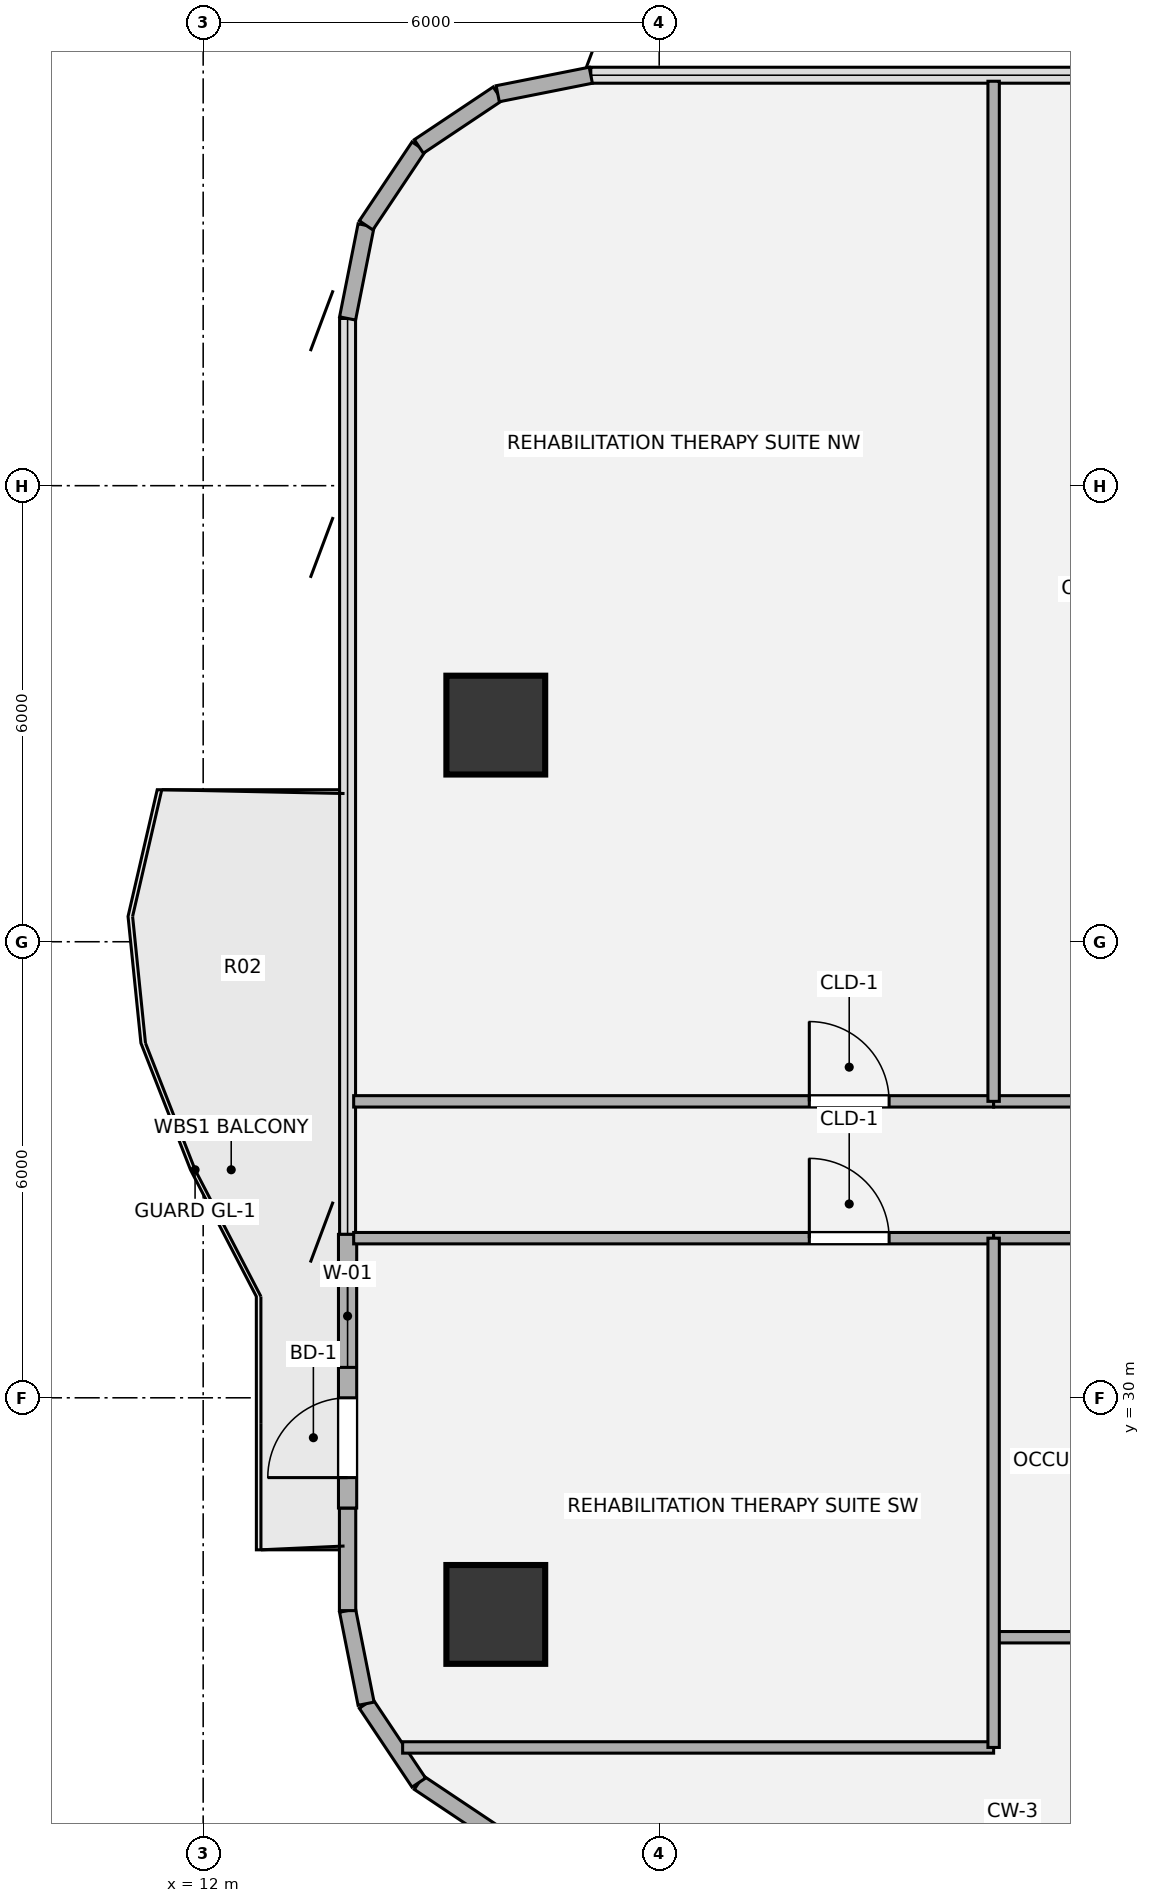
"""IFC4 building model, lengths in metres.
Left out: names, types, materials, properties, quantities, classifications, styles, units other than length and angle.
Written with IfcOpenShell. Run it as: python <this file> out.ifc"""

import sys

from ifc_helpers import new_model, si_unit, direction, frame, frame_2d, origin, origin_2d, place, context, subcontext, project, spatial, rectangle, hollow_circle, extrude, source, transform, mapped, element, fill, save


model = new_model("IFC4")
c1 = context("Model", 3, precision=1e-05, world=origin(), true_north=direction((0.0, 1.0)))
c2 = subcontext(c1, "Body", "Model", "MODEL_VIEW")
j1 = project(units=[si_unit("LENGTHUNIT", "METRE"), si_unit("PLANEANGLEUNIT", "RADIAN")], contexts=[c1])
p1 = place(None, origin())
s1 = spatial("IfcSite", under=j1, at=p1, CompositionType="ELEMENT")
p2 = place(p1, origin())
s2 = spatial("IfcBuilding", under=s1, at=p2, CompositionType="ELEMENT")
p3 = place(p2, frame((0.0, 0.0, 108.72)))
s3 = spatial("IfcBuildingStorey", under=s2, at=p3, CompositionType="ELEMENT", Elevation=108.72)
m1 = source(origin(), c2, "Body", "SweptSolid", [
    extrude(hollow_circle(Radius=0.65, WallThickness=0.045, at=origin_2d()), origin(), (0.0, 0.0, 1.0), 3.78),
])
for number, where, z_axis, x_axis in (
    (1, (15.85, 27.15, 0.0), (0.0, 0.0, 1.0), (1.0, 0.0, 0.0)),
    (2, (15.85, 38.85, 0.0), (0.0, 0.0, 1.0), (1.0, 0.0, 0.0)),
):
    element("IfcColumn", number, at=place(p3, frame(where, z_axis=z_axis, x_axis=x_axis)), inside=s3, PredefinedType="COLUMN", context=c2, shape_type="MappedRepresentation", body=[
        mapped(m1, transform((0.0, 0.0, 0.0), x_axis=(1.0, 0.0, 0.0), y_axis=(0.0, 1.0, 0.0), z_axis=(0.0, 0.0, 1.0), scale=1.0)),
    ])
for number, where, z_axis, x_axis in (
    (3, (15.875, 24.244, 0.0), (0.0, 0.0, 1.0), (-0.831, 0.556, 0.0)),
    (4, (14.837, 24.937, 0.0), (0.0, 0.0, 1.0), (-0.556, 0.831, 0.0)),
    (5, (14.144, 25.975, 0.0), (0.0, 0.0, 1.0), (-0.195, 0.981, 0.0)),
):
    element("IfcWall", number, at=place(p3, frame(where, z_axis=z_axis, x_axis=x_axis)), inside=s3, PredefinedType="SOLIDWALL", context=c2, shape_type="SweptSolid", body=[
        extrude(rectangle(XDim=1.249, YDim=0.215, at=frame_2d((0.624, 0.0))), origin(), (0.0, 0.0, 1.0), 3.53),
    ])
p4 = place(p3, frame((13.9, 27.2, 0.0), z_axis=(0.0, 0.0, 1.0), x_axis=(0.0, 1.0, 0.0)))
e6 = element("IfcWall", 6, at=p4, inside=s3, PredefinedType="SOLIDWALL", context=c2, shape_type="SweptSolid", body=[
    extrude(rectangle(XDim=1.35, YDim=0.215, at=frame_2d((0.675, 0.0))), origin(), (0.0, 0.0, 1.0), 3.53),
])
p5 = place(p3, frame((13.9, 28.55, 0.0), z_axis=(0.0, 0.0, 1.0), x_axis=(0.0, 1.0, 0.0)))
e7 = element("IfcWall", 7, at=p5, inside=s3, PredefinedType="SOLIDWALL", context=c2, shape_type="SweptSolid", body=[
    extrude(rectangle(XDim=3.6, YDim=0.24, at=frame_2d((1.8, 0.0))), origin(), (0.0, 0.0, 1.0), 3.53),
])
p6 = place(p5, frame((0.4, 0.0, 0.0)))
e8 = element("IfcOpeningElement", 8, at=p6, cuts=e7, PredefinedType="OPENING", context=c2, shape_type="SweptSolid", body=[
    extrude(rectangle(XDim=1.05, YDim=2.15, at=origin_2d()), frame((0.525, 0.13, 1.075), z_axis=(0.0, -1.0, 0.0), x_axis=(1.0, 0.0, 0.0)), (0.0, 0.0, 1.0), 0.26),
])
p7 = place(p5, frame((1.85, 0.0, 0.85)))
e9 = element("IfcOpeningElement", 9, at=p7, cuts=e7, PredefinedType="OPENING", context=c2, shape_type="SweptSolid", body=[
    extrude(rectangle(XDim=1.35, YDim=1.35, at=origin_2d()), frame((0.675, 0.13, 0.675), z_axis=(0.0, -1.0, 0.0), x_axis=(1.0, 0.0, 0.0)), (0.0, 0.0, 1.0), 0.26),
])
for number, where, z_axis, x_axis in (
    (10, (13.9, 44.2, 0.0), (0.0, 0.0, 1.0), (0.195, 0.981, 0.0)),
    (11, (14.144, 45.425, 0.0), (0.0, 0.0, 1.0), (0.556, 0.831, 0.0)),
    (12, (14.837, 46.463, 0.0), (0.0, 0.0, 1.0), (0.831, 0.556, 0.0)),
    (13, (15.875, 47.156, 0.0), (0.0, 0.0, 1.0), (0.981, 0.195, 0.0)),
):
    element("IfcWall", number, at=place(p3, frame(where, z_axis=z_axis, x_axis=x_axis)), inside=s3, PredefinedType="SOLIDWALL", context=c2, shape_type="SweptSolid", body=[
        extrude(rectangle(XDim=1.249, YDim=0.215, at=frame_2d((0.624, 0.0))), origin(), (0.0, 0.0, 1.0), 3.53),
    ])
p8 = place(p3, frame((14.624, 25.4, 0.0), z_axis=(0.0, 0.0, 1.0), x_axis=(1.0, 0.0, 0.0)))
e14 = element("IfcWall", 14, at=p8, inside=s3, PredefinedType="PARTITIONING", context=c2, shape_type="SweptSolid", body=[
    extrude(rectangle(XDim=7.776, YDim=0.15, at=frame_2d((3.888, 0.0))), origin(), (0.0, 0.0, 1.0), 3.5),
])
p9 = place(p3, frame((22.4, 26.85, 0.0), z_axis=(0.0, 0.0, 1.0), x_axis=(1.0, 0.0, 0.0)))
e15 = element("IfcWall", 15, at=p9, inside=s3, PredefinedType="PARTITIONING", context=c2, shape_type="SweptSolid", body=[
    extrude(rectangle(XDim=6.1, YDim=0.15, at=frame_2d((3.05, 0.0))), origin(), (0.0, 0.0, 1.0), 3.055),
])
p10 = place(p3, frame((13.98, 32.1, 0.0), z_axis=(0.0, 0.0, 1.0), x_axis=(1.0, 0.0, 0.0)))
e16 = element("IfcWall", 16, at=p10, inside=s3, PredefinedType="PARTITIONING", context=c2, shape_type="SweptSolid", body=[
    extrude(rectangle(XDim=8.42, YDim=0.15, at=frame_2d((4.21, 0.0))), origin(), (0.0, 0.0, 1.0), 2.982),
])
p11 = place(p10, frame((5.995, 0.0, 0.0)))
e17 = element("IfcOpeningElement", 17, at=p11, cuts=e16, PredefinedType="OPENING", context=c2, shape_type="SweptSolid", body=[
    extrude(rectangle(XDim=1.05, YDim=2.1, at=origin_2d()), frame((0.525, 0.085, 1.05), z_axis=(0.0, -1.0, 0.0), x_axis=(1.0, 0.0, 0.0)), (0.0, 0.0, 1.0), 0.17),
])
p12 = place(p3, frame((22.4, 32.1, 0.0), z_axis=(0.0, 0.0, 1.0), x_axis=(1.0, 0.0, 0.0)))
e18 = element("IfcWall", 18, at=p12, inside=s3, PredefinedType="PARTITIONING", context=c2, shape_type="SweptSolid", body=[
    extrude(rectangle(XDim=6.1, YDim=0.15, at=frame_2d((3.05, 0.0))), origin(), (0.0, 0.0, 1.0), 2.982),
])
p13 = place(p12, frame((2.525, 0.0, 0.0)))
e19 = element("IfcOpeningElement", 19, at=p13, cuts=e18, PredefinedType="OPENING", context=c2, shape_type="SweptSolid", body=[
    extrude(rectangle(XDim=1.05, YDim=2.1, at=origin_2d()), frame((0.525, 0.085, 1.05), z_axis=(0.0, -1.0, 0.0), x_axis=(1.0, 0.0, 0.0)), (0.0, 0.0, 1.0), 0.17),
])
p14 = place(p3, frame((13.98, 33.9, 0.0), z_axis=(0.0, 0.0, 1.0), x_axis=(1.0, 0.0, 0.0)))
e20 = element("IfcWall", 20, at=p14, inside=s3, PredefinedType="PARTITIONING", context=c2, shape_type="SweptSolid", body=[
    extrude(rectangle(XDim=8.42, YDim=0.15, at=frame_2d((4.21, 0.0))), origin(), (0.0, 0.0, 1.0), 2.982),
])
p15 = place(p14, frame((5.995, 0.0, 0.0)))
e21 = element("IfcOpeningElement", 21, at=p15, cuts=e20, PredefinedType="OPENING", context=c2, shape_type="SweptSolid", body=[
    extrude(rectangle(XDim=1.05, YDim=2.1, at=origin_2d()), frame((0.525, 0.085, 1.05), z_axis=(0.0, -1.0, 0.0), x_axis=(1.0, 0.0, 0.0)), (0.0, 0.0, 1.0), 0.17),
])
p16 = place(p3, frame((22.4, 33.9, 0.0), z_axis=(0.0, 0.0, 1.0), x_axis=(1.0, 0.0, 0.0)))
e22 = element("IfcWall", 22, at=p16, inside=s3, PredefinedType="PARTITIONING", context=c2, shape_type="SweptSolid", body=[
    extrude(rectangle(XDim=6.1, YDim=0.15, at=frame_2d((3.05, 0.0))), origin(), (0.0, 0.0, 1.0), 2.982),
])
p17 = place(p16, frame((2.525, 0.0, 0.0)))
e23 = element("IfcOpeningElement", 23, at=p17, cuts=e22, PredefinedType="OPENING", context=c2, shape_type="SweptSolid", body=[
    extrude(rectangle(XDim=1.05, YDim=2.1, at=origin_2d()), frame((0.525, 0.085, 1.05), z_axis=(0.0, -1.0, 0.0), x_axis=(1.0, 0.0, 0.0)), (0.0, 0.0, 1.0), 0.17),
])
p18 = place(p3, frame((22.4, 25.4, 0.0), z_axis=(0.0, 0.0, 1.0), x_axis=(0.0, 1.0, 0.0)))
e24 = element("IfcWall", 24, at=p18, inside=s3, PredefinedType="PARTITIONING", context=c2, shape_type="SweptSolid", body=[
    extrude(rectangle(XDim=6.7, YDim=0.15, at=frame_2d((3.35, 0.0))), origin(), (0.0, 0.0, 1.0), 3.5),
])
p19 = place(p3, frame((22.4, 33.9, 0.0), z_axis=(0.0, 0.0, 1.0), x_axis=(0.0, 1.0, 0.0)))
e25 = element("IfcWall", 25, at=p19, inside=s3, PredefinedType="PARTITIONING", context=c2, shape_type="SweptSolid", body=[
    extrude(rectangle(XDim=13.421, YDim=0.15, at=frame_2d((6.71, 0.0))), origin(), (0.0, 0.0, 1.0), 3.5),
])
m2 = source(origin(), c2, "Body", "SweptSolid", [
    extrude(rectangle(XDim=1.05, YDim=2.15, at=origin_2d()), frame((0.525, 0.025, 1.075), z_axis=(0.0, -1.0, 0.0), x_axis=(1.0, 0.0, 0.0)), (0.0, 0.0, 1.0), 0.05),
])
p20 = place(p6, origin())
e26 = element("IfcDoor", 26, at=p20, inside=s3, OperationType="SINGLE_SWING_LEFT", PredefinedType="DOOR", context=c2, shape_type="MappedRepresentation", body=[
    mapped(m2, transform((0.0, 0.0, 0.0), x_axis=(1.0, 0.0, 0.0), y_axis=(0.0, 1.0, 0.0), z_axis=(0.0, 0.0, 1.0), scale=1.0)),
])
fill(e8, e26)
m3 = source(origin(), c2, "Body", "SweptSolid", [
    extrude(rectangle(XDim=1.35, YDim=1.35, at=origin_2d()), frame((0.675, 0.03, 0.675), z_axis=(0.0, -1.0, 0.0), x_axis=(1.0, 0.0, 0.0)), (0.0, 0.0, 1.0), 0.06),
])
p21 = place(p7, origin())
e27 = element("IfcWindow", 27, at=p21, inside=s3, PartitioningType="SINGLE_PANEL", PredefinedType="WINDOW", context=c2, shape_type="MappedRepresentation", body=[
    mapped(m3, transform((0.0, 0.0, 0.0), x_axis=(1.0, 0.0, 0.0), y_axis=(0.0, 1.0, 0.0), z_axis=(0.0, 0.0, 1.0), scale=1.0)),
])
fill(e9, e27)
m4 = source(origin(), c2, "Body", "SweptSolid", [
    extrude(rectangle(XDim=1.05, YDim=2.1, at=origin_2d()), frame((0.525, 0.025, 1.05), z_axis=(0.0, -1.0, 0.0), x_axis=(1.0, 0.0, 0.0)), (0.0, 0.0, 1.0), 0.05),
])
p22 = place(p11, origin())
e28 = element("IfcDoor", 28, at=p22, inside=s3, OperationType="SINGLE_SWING_LEFT", PredefinedType="DOOR", context=c2, shape_type="MappedRepresentation", body=[
    mapped(m4, transform((0.0, 0.0, 0.0), x_axis=(1.0, 0.0, 0.0), y_axis=(0.0, 1.0, 0.0), z_axis=(0.0, 0.0, 1.0), scale=1.0)),
])
fill(e17, e28)
p23 = place(p15, origin())
e29 = element("IfcDoor", 29, at=p23, inside=s3, OperationType="SINGLE_SWING_LEFT", PredefinedType="DOOR", context=c2, shape_type="MappedRepresentation", body=[
    mapped(m4, transform((0.0, 0.0, 0.0), x_axis=(1.0, 0.0, 0.0), y_axis=(0.0, 1.0, 0.0), z_axis=(0.0, 0.0, 1.0), scale=1.0)),
])
fill(e21, e29)
save(model, sys.argv[1])
